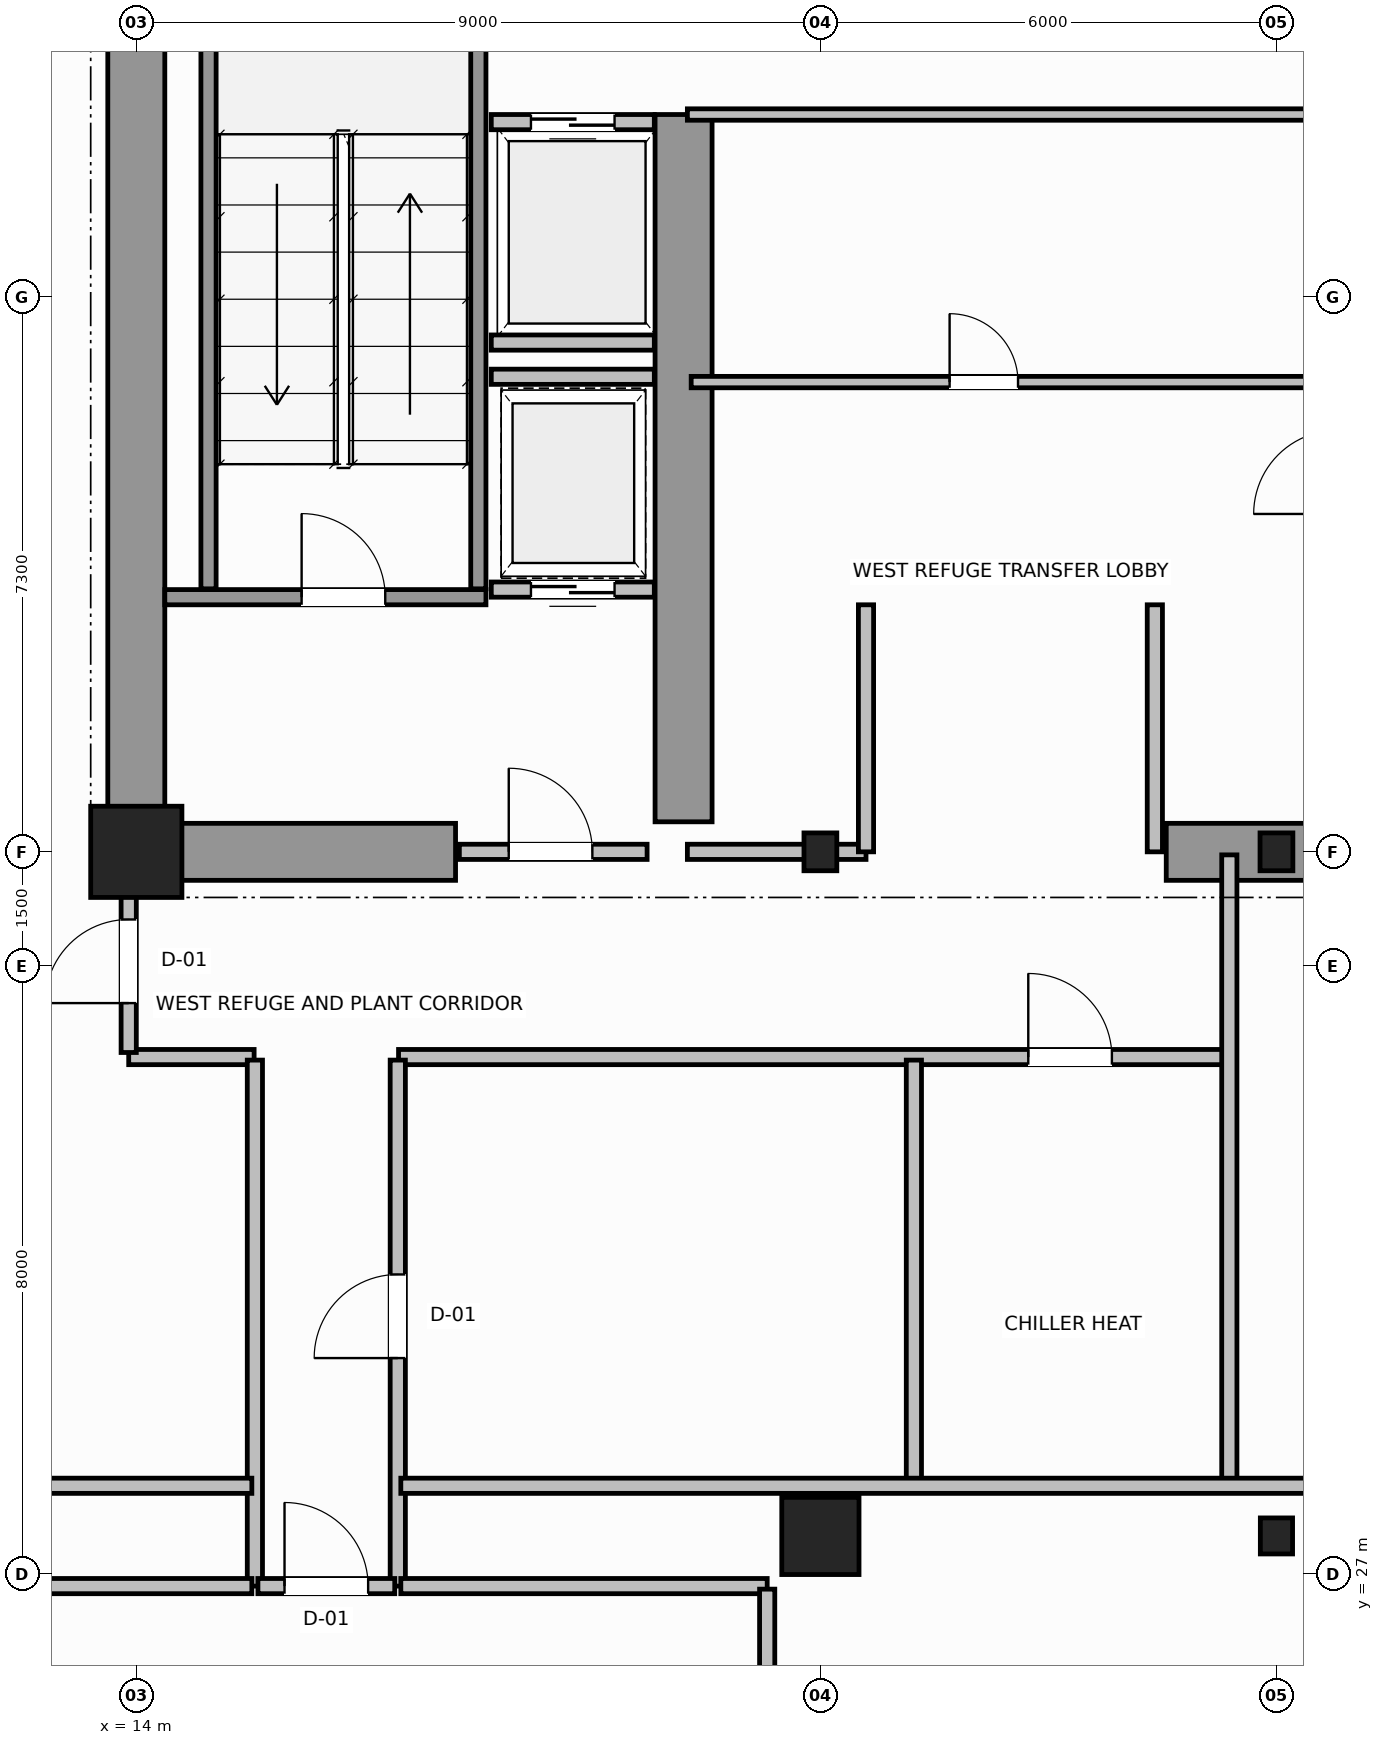
"""IFC4 building model, lengths in metres.
Left out: names, types, materials, properties, quantities, classifications, styles, units other than length and angle.
Written with IfcOpenShell. Run it as: python <this file> out.ifc"""

import sys

from ifc_helpers import new_model, si_unit, direction, frame, frame_2d, origin, origin_2d, place, context, subcontext, project, spatial, rectangle, hollow_circle, i_section, extrude, source, transform, mapped, element, fill, save


model = new_model("IFC4")
c1 = context("Model", 3, precision=1e-05, world=origin(), true_north=direction((0.0, 1.0)))
c2 = subcontext(c1, "Body", "Model", "MODEL_VIEW")
j1 = project(units=[si_unit("LENGTHUNIT", "METRE"), si_unit("PLANEANGLEUNIT", "RADIAN")], contexts=[c1])
p1 = place(None, origin())
s1 = spatial("IfcSite", under=j1, at=p1, CompositionType="ELEMENT")
p2 = place(p1, origin())
s2 = spatial("IfcBuilding", under=s1, at=p2, CompositionType="ELEMENT")
p3 = place(p2, frame((0.0, 0.0, 149.0)))
s3 = spatial("IfcBuildingStorey", under=s2, at=p3, CompositionType="ELEMENT", Elevation=149.0)
m1 = source(origin(), c2, "Body", "SweptSolid", [
    extrude(rectangle(XDim=1.2, YDim=1.2, at=origin_2d()), origin(), (0.0, 0.0, 1.0), 4.8),
])
p4 = place(p3, frame((14.0, 36.5, 0.0), z_axis=(0.0, 0.0, 1.0), x_axis=(1.0, 0.0, 0.0)))
e1 = element("IfcColumn", 1, at=p4, inside=s3, PredefinedType="COLUMN", context=c2, shape_type="MappedRepresentation", body=[
    mapped(m1, transform((0.0, 0.0, 0.0), scale=1.0)),
])
m2 = source(origin(), c2, "Body", "SweptSolid", [
    extrude(i_section(OverallWidth=0.432, OverallDepth=0.498, WebThickness=0.055, FlangeThickness=0.068, FilletRadius=0.015, at=origin_2d()), origin(), (0.0, 0.0, 1.0), 4.8),
])
for number, where, z_axis, x_axis in (
    (2, (23.0, 36.5, 0.0), (0.0, 0.0, 1.0), (1.0, 0.0, 0.0)),
    (3, (29.0, 36.5, 0.0), (0.0, 0.0, 1.0), (1.0, 0.0, 0.0)),
):
    element("IfcColumn", number, at=place(p3, frame(where, z_axis=z_axis, x_axis=x_axis)), inside=s3, PredefinedType="COLUMN", context=c2, shape_type="MappedRepresentation", body=[
        mapped(m2, transform((0.0, 0.0, 0.0), scale=1.0)),
    ])
m3 = source(origin(), c2, "Body", "SweptSolid", [
    extrude(hollow_circle(Radius=0.508, WallThickness=0.045, at=origin_2d()), origin(), (0.0, 0.0, 1.0), 4.8),
])
p5 = place(p3, frame((23.0, 27.5, 0.0), z_axis=(0.0, 0.0, 1.0), x_axis=(1.0, 0.0, 0.0)))
e4 = element("IfcColumn", 4, at=p5, inside=s3, PredefinedType="COLUMN", context=c2, shape_type="MappedRepresentation", body=[
    mapped(m3, transform((0.0, 0.0, 0.0), scale=1.0)),
])
m4 = source(origin(), c2, "Body", "SweptSolid", [
    extrude(i_section(OverallWidth=0.424, OverallDepth=0.474, WebThickness=0.047, FlangeThickness=0.065, FilletRadius=0.015, at=origin_2d()), origin(), (0.0, 0.0, 1.0), 4.8),
])
p6 = place(p3, frame((29.0, 27.5, 0.0), z_axis=(0.0, 0.0, 1.0), x_axis=(1.0, 0.0, 0.0)))
e5 = element("IfcColumn", 5, at=p6, inside=s3, PredefinedType="COLUMN", context=c2, shape_type="MappedRepresentation", body=[
    mapped(m4, transform((0.0, 0.0, 0.0), scale=1.0)),
])
p7 = place(p3, frame((14.0, 36.5, 0.0), z_axis=(0.0, 0.0, 1.0), x_axis=(0.0, 1.0, 0.0)))
e6 = element("IfcWall", 6, at=p7, inside=s3, PredefinedType="SHEAR", context=c2, shape_type="SweptSolid", body=[
    extrude(rectangle(XDim=14.5, YDim=0.75, at=frame_2d((7.25, 0.0))), origin(), (0.0, 0.0, 1.0), 4.8),
])
p8 = place(p3, frame((14.395, 36.5, 0.0), z_axis=(0.0, 0.0, 1.0), x_axis=(1.0, 0.0, 0.0)))
e7 = element("IfcWall", 7, at=p8, inside=s3, PredefinedType="SHEAR", context=c2, shape_type="SweptSolid", body=[
    extrude(rectangle(XDim=3.805, YDim=0.75, at=frame_2d((1.902, 0.0))), origin(), (0.0, 0.0, 1.0), 3.34),
])
p9 = place(p3, frame((27.55, 36.5, 0.0), z_axis=(0.0, 0.0, 1.0), x_axis=(1.0, 0.0, 0.0)))
e8 = element("IfcWall", 8, at=p9, inside=s3, PredefinedType="SHEAR", context=c2, shape_type="SweptSolid", body=[
    extrude(rectangle(XDim=4.5, YDim=0.75, at=frame_2d((2.25, 0.0))), origin(), (0.0, 0.0, 1.0), 4.8),
])
p10 = place(p3, frame((21.2, 36.895, 0.0), z_axis=(0.0, 0.0, 1.0), x_axis=(0.0, 1.0, 0.0)))
e9 = element("IfcWall", 9, at=p10, inside=s3, PredefinedType="SHEAR", context=c2, shape_type="SweptSolid", body=[
    extrude(rectangle(XDim=9.305, YDim=0.75, at=frame_2d((4.652, 0.0))), origin(), (0.0, 0.0, 1.0), 4.8),
])
p11 = place(p3, frame((14.375, 39.85, 0.0), z_axis=(0.0, 0.0, 1.0), x_axis=(1.0, 0.0, 0.0)))
e10 = element("IfcWall", 10, at=p11, inside=s3, PredefinedType="SOLIDWALL", context=c2, shape_type="SweptSolid", body=[
    extrude(rectangle(XDim=4.225, YDim=0.2, at=frame_2d((2.113, 0.0))), origin(), (0.0, 0.0, 1.0), 4.8),
])
p12 = place(p11, frame((1.8, 0.0, 0.0)))
e11 = element("IfcOpeningElement", 11, at=p12, cuts=e10, PredefinedType="OPENING", context=c2, shape_type="SweptSolid", body=[
    extrude(rectangle(XDim=1.1, YDim=2.15, at=frame_2d((0.55, 1.075))), frame((0.0, 0.11, 0.0), z_axis=(0.0, -1.0, 0.0), x_axis=(1.0, 0.0, 0.0)), (0.0, 0.0, 1.0), 0.22),
])
for number, where, z_axis, x_axis in (
    (12, (14.95, 39.96, 0.0), (0.0, 0.0, 1.0), (0.0, 1.0, 0.0)),
    (13, (18.5, 39.96, 0.0), (0.0, 0.0, 1.0), (0.0, 1.0, 0.0)),
):
    element("IfcWall", number, at=place(p3, frame(where, z_axis=z_axis, x_axis=x_axis)), inside=s3, PredefinedType="SOLIDWALL", context=c2, shape_type="SweptSolid", body=[
        extrude(rectangle(XDim=9.93, YDim=0.2, at=frame_2d((4.965, 0.0))), origin(), (0.0, 0.0, 1.0), 4.8),
    ])
p13 = place(p3, frame((18.25, 36.5, 0.0), z_axis=(0.0, 0.0, 1.0), x_axis=(1.0, 0.0, 0.0)))
e14 = element("IfcWall", 14, at=p13, inside=s3, PredefinedType="SOLIDWALL", context=c2, shape_type="SweptSolid", body=[
    extrude(rectangle(XDim=2.47, YDim=0.2, at=frame_2d((1.235, 0.0))), origin(), (0.0, 0.0, 1.0), 3.33),
])
p14 = place(p13, frame((0.65, 0.0, 0.0)))
e15 = element("IfcOpeningElement", 15, at=p14, cuts=e14, PredefinedType="OPENING", context=c2, shape_type="SweptSolid", body=[
    extrude(rectangle(XDim=1.1, YDim=2.15, at=frame_2d((0.55, 1.075))), frame((0.0, 0.11, 0.0), z_axis=(0.0, -1.0, 0.0), x_axis=(1.0, 0.0, 0.0)), (0.0, 0.0, 1.0), 0.22),
])
p15 = place(p3, frame((18.67, 46.1, 0.0), z_axis=(0.0, 0.0, 1.0), x_axis=(1.0, 0.0, 0.0)))
e16 = element("IfcWall", 16, at=p15, inside=s3, PredefinedType="SOLIDWALL", context=c2, shape_type="SweptSolid", body=[
    extrude(rectangle(XDim=2.145, YDim=0.2, at=frame_2d((1.073, 0.0))), origin(), (0.0, 0.0, 1.0), 4.54),
])
p16 = place(p15, frame((0.522, 0.0, 0.0)))
e17 = element("IfcOpeningElement", 17, at=p16, cuts=e16, PredefinedType="OPENING", context=c2, shape_type="SweptSolid", body=[
    extrude(rectangle(XDim=1.1, YDim=2.15, at=frame_2d((0.55, 1.075))), frame((0.0, 0.11, 0.0), z_axis=(0.0, -1.0, 0.0), x_axis=(1.0, 0.0, 0.0)), (0.0, 0.0, 1.0), 0.22),
])
p17 = place(p3, frame((18.67, 43.2, 0.0), z_axis=(0.0, 0.0, 1.0), x_axis=(1.0, 0.0, 0.0)))
e18 = element("IfcWall", 18, at=p17, inside=s3, PredefinedType="SOLIDWALL", context=c2, shape_type="SweptSolid", body=[
    extrude(rectangle(XDim=2.145, YDim=0.2, at=frame_2d((1.073, 0.0))), origin(), (0.0, 0.0, 1.0), 4.54),
])
p18 = place(p3, frame((18.67, 39.95, 0.0), z_axis=(0.0, 0.0, 1.0), x_axis=(1.0, 0.0, 0.0)))
e19 = element("IfcWall", 19, at=p18, inside=s3, PredefinedType="SOLIDWALL", context=c2, shape_type="SweptSolid", body=[
    extrude(rectangle(XDim=2.145, YDim=0.2, at=frame_2d((1.073, 0.0))), origin(), (0.0, 0.0, 1.0), 4.54),
])
p19 = place(p18, frame((0.522, 0.0, 0.0)))
e20 = element("IfcOpeningElement", 20, at=p19, cuts=e19, PredefinedType="OPENING", context=c2, shape_type="SweptSolid", body=[
    extrude(rectangle(XDim=1.1, YDim=2.15, at=frame_2d((0.55, 1.075))), frame((0.0, 0.11, 0.0), z_axis=(0.0, -1.0, 0.0), x_axis=(1.0, 0.0, 0.0)), (0.0, 0.0, 1.0), 0.22),
])
p20 = place(p3, frame((18.67, 42.75, 0.0), z_axis=(0.0, 0.0, 1.0), x_axis=(1.0, 0.0, 0.0)))
e21 = element("IfcWall", 21, at=p20, inside=s3, PredefinedType="SOLIDWALL", context=c2, shape_type="SweptSolid", body=[
    extrude(rectangle(XDim=2.145, YDim=0.2, at=frame_2d((1.073, 0.0))), origin(), (0.0, 0.0, 1.0), 4.54),
])
p21 = place(p3, frame((21.25, 36.5, 0.0), z_axis=(0.0, 0.0, 1.0), x_axis=(1.0, 0.0, 0.0)))
e22 = element("IfcWall", 22, at=p21, inside=s3, PredefinedType="SOLIDWALL", context=c2, shape_type="SweptSolid", body=[
    extrude(rectangle(XDim=2.35, YDim=0.2, at=frame_2d((1.175, 0.0))), origin(), (0.0, 0.0, 1.0), 3.33),
])
for number, where, z_axis, x_axis in (
    (23, (23.6, 36.5, 0.0), (0.0, 0.0, 1.0), (0.0, 1.0, 0.0)),
    (24, (27.4, 36.5, 0.0), (0.0, 0.0, 1.0), (0.0, 1.0, 0.0)),
):
    element("IfcWall", number, at=place(p3, frame(where, z_axis=z_axis, x_axis=x_axis)), inside=s3, PredefinedType="SOLIDWALL", context=c2, shape_type="SweptSolid", body=[
        extrude(rectangle(XDim=3.25, YDim=0.2, at=frame_2d((1.625, 0.0))), origin(), (0.0, 0.0, 1.0), 4.54),
    ])
p22 = place(p3, frame((21.25, 46.2, 0.0), z_axis=(0.0, 0.0, 1.0), x_axis=(1.0, 0.0, 0.0)))
e25 = element("IfcWall", 25, at=p22, inside=s3, PredefinedType="PARTITIONING", context=c2, shape_type="SweptSolid", body=[
    extrude(rectangle(XDim=8.5, YDim=0.15, at=frame_2d((4.25, 0.0))), origin(), (0.0, 0.0, 1.0), 4.54),
])
p23 = place(p3, frame((21.3, 42.68, 0.0), z_axis=(0.0, 0.0, 1.0), x_axis=(1.0, 0.0, 0.0)))
e26 = element("IfcWall", 26, at=p23, inside=s3, PredefinedType="PARTITIONING", context=c2, shape_type="SweptSolid", body=[
    extrude(rectangle(XDim=8.4, YDim=0.15, at=frame_2d((4.2, 0.0))), origin(), (0.0, 0.0, 1.0), 4.54),
])
p24 = place(p23, frame((3.4, 0.0, 0.0)))
e27 = element("IfcOpeningElement", 27, at=p24, cuts=e26, PredefinedType="OPENING", context=c2, shape_type="SweptSolid", body=[
    extrude(rectangle(XDim=0.9, YDim=2.1, at=frame_2d((0.45, 1.05))), frame((0.0, 0.085, 0.0), z_axis=(0.0, -1.0, 0.0), x_axis=(1.0, 0.0, 0.0)), (0.0, 0.0, 1.0), 0.17),
])
p25 = place(p3, frame((13.9, 33.8, 0.0), z_axis=(0.0, 0.0, 1.0), x_axis=(1.0, 0.0, 0.0)))
e28 = element("IfcWall", 28, at=p25, inside=s3, PredefinedType="SOLIDWALL", context=c2, shape_type="SweptSolid", body=[
    extrude(rectangle(XDim=1.65, YDim=0.2, at=frame_2d((0.825, 0.0))), origin(), (0.0, 0.0, 1.0), 4.54),
])
p26 = place(p3, frame((17.45, 33.8, 0.0), z_axis=(0.0, 0.0, 1.0), x_axis=(1.0, 0.0, 0.0)))
e29 = element("IfcWall", 29, at=p26, inside=s3, PredefinedType="SOLIDWALL", context=c2, shape_type="SweptSolid", body=[
    extrude(rectangle(XDim=10.91, YDim=0.2, at=frame_2d((5.455, 0.0))), origin(), (0.0, 0.0, 1.0), 4.54),
])
p27 = place(p26, frame((8.285, 0.0, 0.0)))
e30 = element("IfcOpeningElement", 30, at=p27, cuts=e29, PredefinedType="OPENING", context=c2, shape_type="SweptSolid", body=[
    extrude(rectangle(XDim=1.1, YDim=2.15, at=frame_2d((0.55, 1.075))), frame((0.0, 0.11, 0.0), z_axis=(0.0, -1.0, 0.0), x_axis=(1.0, 0.0, 0.0)), (0.0, 0.0, 1.0), 0.22),
])
p28 = place(p3, frame((13.9, 33.86, 0.0), z_axis=(0.0, 0.0, 1.0), x_axis=(0.0, 1.0, 0.0)))
e31 = element("IfcWall", 31, at=p28, inside=s3, PredefinedType="SOLIDWALL", context=c2, shape_type="SweptSolid", body=[
    extrude(rectangle(XDim=2.58, YDim=0.2, at=frame_2d((1.29, 0.0))), origin(), (0.0, 0.0, 1.0), 4.54),
])
p29 = place(p28, frame((0.65, 0.0, 0.0)))
e32 = element("IfcOpeningElement", 32, at=p29, cuts=e31, PredefinedType="OPENING", context=c2, shape_type="SweptSolid", body=[
    extrude(rectangle(XDim=1.1, YDim=2.15, at=frame_2d((0.55, 1.075))), frame((0.0, 0.11, 0.0), z_axis=(0.0, -1.0, 0.0), x_axis=(1.0, 0.0, 0.0)), (0.0, 0.0, 1.0), 0.22),
])
p30 = place(p3, frame((15.56, 26.84, 0.0), z_axis=(0.0, 0.0, 1.0), x_axis=(0.0, 1.0, 0.0)))
e33 = element("IfcWall", 33, at=p30, inside=s3, PredefinedType="SOLIDWALL", context=c2, shape_type="SweptSolid", body=[
    extrude(rectangle(XDim=6.92, YDim=0.2, at=frame_2d((3.46, 0.0))), origin(), (0.0, 0.0, 1.0), 4.54),
])
p31 = place(p3, frame((17.44, 26.84, 0.0), z_axis=(0.0, 0.0, 1.0), x_axis=(0.0, 1.0, 0.0)))
e34 = element("IfcWall", 34, at=p31, inside=s3, PredefinedType="SOLIDWALL", context=c2, shape_type="SweptSolid", body=[
    extrude(rectangle(XDim=6.92, YDim=0.2, at=frame_2d((3.46, 0.0))), origin(), (0.0, 0.0, 1.0), 4.54),
])
p32 = place(p31, frame((3.0, 0.0, 0.0)))
e35 = element("IfcOpeningElement", 35, at=p32, cuts=e34, PredefinedType="OPENING", context=c2, shape_type="SweptSolid", body=[
    extrude(rectangle(XDim=1.1, YDim=2.15, at=frame_2d((0.55, 1.075))), frame((0.0, 0.11, 0.0), z_axis=(0.0, -1.0, 0.0), x_axis=(1.0, 0.0, 0.0)), (0.0, 0.0, 1.0), 0.22),
])
p33 = place(p3, frame((15.6, 26.84, 0.0), z_axis=(0.0, 0.0, 1.0), x_axis=(1.0, 0.0, 0.0)))
e36 = element("IfcWall", 36, at=p33, inside=s3, PredefinedType="SOLIDWALL", context=c2, shape_type="SweptSolid", body=[
    extrude(rectangle(XDim=1.8, YDim=0.2, at=frame_2d((0.9, 0.0))), origin(), (0.0, 0.0, 1.0), 4.54),
])
p34 = place(p33, frame((0.35, 0.0, 0.0)))
e37 = element("IfcOpeningElement", 37, at=p34, cuts=e36, PredefinedType="OPENING", context=c2, shape_type="SweptSolid", body=[
    extrude(rectangle(XDim=1.1, YDim=2.15, at=frame_2d((0.55, 1.075))), frame((0.0, 0.11, 0.0), z_axis=(0.0, -1.0, 0.0), x_axis=(1.0, 0.0, 0.0)), (0.0, 0.0, 1.0), 0.22),
])
p35 = place(p3, frame((28.38, 28.16, 0.0), z_axis=(0.0, 0.0, 1.0), x_axis=(0.0, 1.0, 0.0)))
e38 = element("IfcWall", 38, at=p35, inside=s3, PredefinedType="SOLIDWALL", context=c2, shape_type="SweptSolid", body=[
    extrude(rectangle(XDim=8.3, YDim=0.2, at=frame_2d((4.15, 0.0))), origin(), (0.0, 0.0, 1.0), 4.54),
])
p36 = place(p3, frame((24.23, 28.16, 0.0), z_axis=(0.0, 0.0, 1.0), x_axis=(0.0, 1.0, 0.0)))
e39 = element("IfcWall", 39, at=p36, inside=s3, PredefinedType="SOLIDWALL", context=c2, shape_type="SweptSolid", body=[
    extrude(rectangle(XDim=5.6, YDim=0.2, at=frame_2d((2.8, 0.0))), origin(), (0.0, 0.0, 1.0), 4.54),
])
p37 = place(p3, frame((8.765, 28.16, 0.0), z_axis=(0.0, 0.0, 1.0), x_axis=(1.0, 0.0, 0.0)))
e40 = element("IfcWall", 40, at=p37, inside=s3, PredefinedType="SOLIDWALL", context=c2, shape_type="SweptSolid", body=[
    extrude(rectangle(XDim=6.755, YDim=0.2, at=frame_2d((3.377, 0.0))), origin(), (0.0, 0.0, 1.0), 4.54),
])
p38 = place(p3, frame((17.48, 28.16, 0.0), z_axis=(0.0, 0.0, 1.0), x_axis=(1.0, 0.0, 0.0)))
e41 = element("IfcWall", 41, at=p38, inside=s3, PredefinedType="SOLIDWALL", context=c2, shape_type="SweptSolid", body=[
    extrude(rectangle(XDim=33.04, YDim=0.2, at=frame_2d((16.52, 0.0))), origin(), (0.0, 0.0, 1.0), 4.54),
])
p39 = place(p3, frame((9.004, 26.84, 0.0), z_axis=(0.0, 0.0, 1.0), x_axis=(1.0, 0.0, 0.0)))
e42 = element("IfcWall", 42, at=p39, inside=s3, PredefinedType="SOLIDWALL", context=c2, shape_type="SweptSolid", body=[
    extrude(rectangle(XDim=6.516, YDim=0.2, at=frame_2d((3.258, 0.0))), origin(), (0.0, 0.0, 1.0), 4.54),
])
p40 = place(p3, frame((17.48, 26.84, 0.0), z_axis=(0.0, 0.0, 1.0), x_axis=(1.0, 0.0, 0.0)))
e43 = element("IfcWall", 43, at=p40, inside=s3, PredefinedType="SOLIDWALL", context=c2, shape_type="SweptSolid", body=[
    extrude(rectangle(XDim=4.82, YDim=0.2, at=frame_2d((2.41, 0.0))), origin(), (0.0, 0.0, 1.0), 4.54),
])
p41 = place(p3, frame((22.3, 18.62, 0.0), z_axis=(0.0, 0.0, 1.0), x_axis=(0.0, 1.0, 0.0)))
e44 = element("IfcWall", 44, at=p41, inside=s3, PredefinedType="SOLIDWALL", context=c2, shape_type="SweptSolid", body=[
    extrude(rectangle(XDim=8.18, YDim=0.2, at=frame_2d((4.09, 0.0))), origin(), (0.0, 0.0, 1.0), 4.54),
])
m5 = source(origin(), c2, "Body", "SweptSolid", [
    extrude(rectangle(XDim=1.1, YDim=2.15, at=frame_2d((0.55, 1.075))), frame((0.0, 0.025, 0.0), z_axis=(0.0, -1.0, 0.0), x_axis=(1.0, 0.0, 0.0)), (0.0, 0.0, 1.0), 0.05),
])
p42 = place(p12, origin())
e45 = element("IfcDoor", 45, at=p42, inside=s3, OperationType="SINGLE_SWING_LEFT", PredefinedType="DOOR", context=c2, shape_type="MappedRepresentation", body=[
    mapped(m5, transform((0.0, 0.0, 0.0), scale=1.0)),
])
fill(e11, e45)
p43 = place(p14, origin())
e46 = element("IfcDoor", 46, at=p43, inside=s3, OperationType="SINGLE_SWING_RIGHT", PredefinedType="DOOR", context=c2, shape_type="MappedRepresentation", body=[
    mapped(m5, transform((0.0, 0.0, 0.0), scale=1.0)),
])
fill(e15, e46)
p44 = place(p16, origin())
e47 = element("IfcDoor", 47, at=p44, inside=s3, OperationType="DOUBLE_DOOR_SLIDING", PredefinedType="DOOR", context=c2, shape_type="MappedRepresentation", body=[
    mapped(m5, transform((0.0, 0.0, 0.0), scale=1.0)),
])
fill(e17, e47)
p45 = place(p19, origin())
e48 = element("IfcDoor", 48, at=p45, inside=s3, OperationType="DOUBLE_DOOR_SLIDING", PredefinedType="DOOR", context=c2, shape_type="MappedRepresentation", body=[
    mapped(m5, transform((0.0, 0.0, 0.0), scale=1.0)),
])
fill(e20, e48)
m6 = source(origin(), c2, "Body", "SweptSolid", [
    extrude(rectangle(XDim=0.9, YDim=2.1, at=frame_2d((0.45, 1.05))), frame((0.0, 0.025, 0.0), z_axis=(0.0, -1.0, 0.0), x_axis=(1.0, 0.0, 0.0)), (0.0, 0.0, 1.0), 0.05),
])
p46 = place(p24, origin())
e49 = element("IfcDoor", 49, at=p46, inside=s3, OperationType="SINGLE_SWING_RIGHT", PredefinedType="DOOR", context=c2, shape_type="MappedRepresentation", body=[
    mapped(m6, transform((0.0, 0.0, 0.0), scale=1.0)),
])
fill(e27, e49)
p47 = place(p29, origin())
e50 = element("IfcDoor", 50, at=p47, inside=s3, OperationType="SINGLE_SWING_LEFT", PredefinedType="DOOR", context=c2, shape_type="MappedRepresentation", body=[
    mapped(m5, transform((0.0, 0.0, 0.0), scale=1.0)),
])
fill(e32, e50)
p48 = place(p32, origin())
e51 = element("IfcDoor", 51, at=p48, inside=s3, OperationType="SINGLE_SWING_RIGHT", PredefinedType="DOOR", context=c2, shape_type="MappedRepresentation", body=[
    mapped(m5, transform((0.0, 0.0, 0.0), scale=1.0)),
])
fill(e35, e51)
p49 = place(p34, origin())
e52 = element("IfcDoor", 52, at=p49, inside=s3, OperationType="SINGLE_SWING_LEFT", PredefinedType="DOOR", context=c2, shape_type="MappedRepresentation", body=[
    mapped(m5, transform((0.0, 0.0, 0.0), scale=1.0)),
])
fill(e37, e52)
p50 = place(p27, origin())
e53 = element("IfcDoor", 53, at=p50, inside=s3, OperationType="SINGLE_SWING_LEFT", PredefinedType="DOOR", context=c2, shape_type="MappedRepresentation", body=[
    mapped(m5, transform((0.0, 0.0, 0.0), scale=1.0)),
])
fill(e30, e53)
save(model, sys.argv[1])
